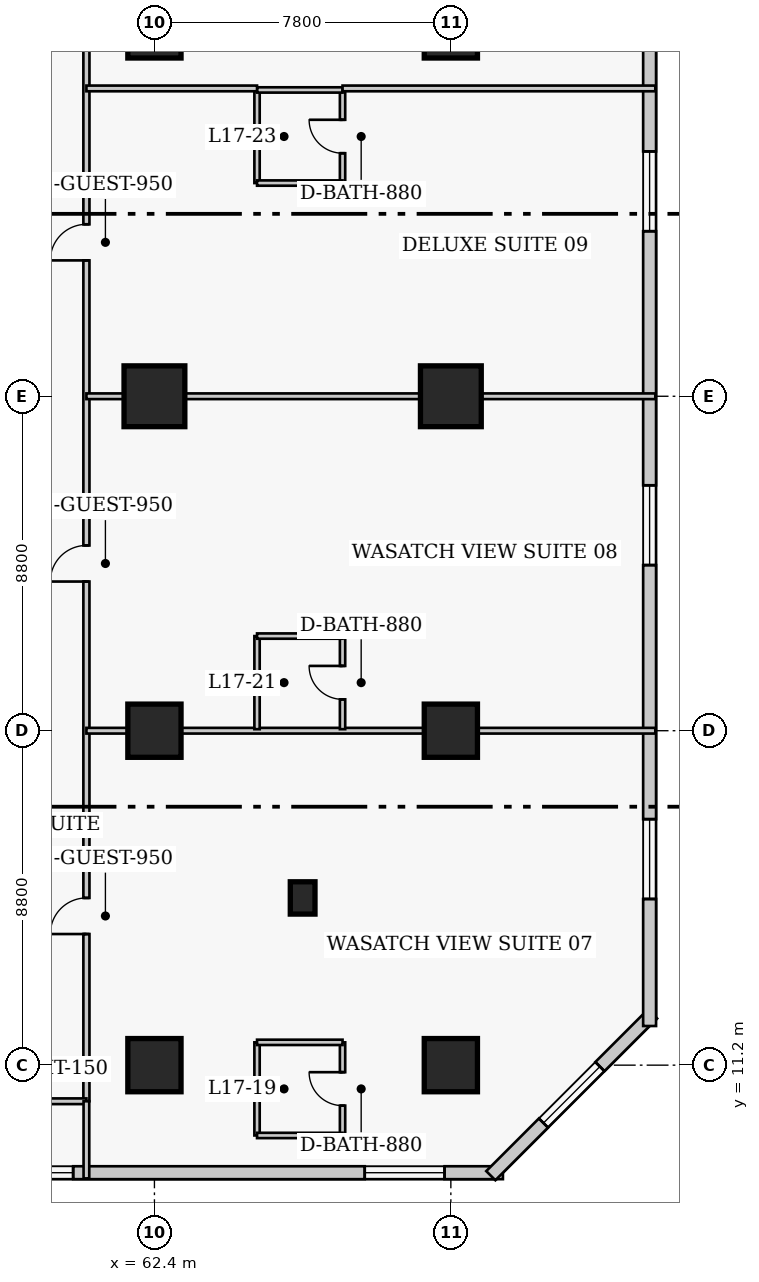
"""IFC4 building model, lengths in metres.
Left out: names, types, materials, properties, quantities, classifications, styles, units other than length and angle.
Written with IfcOpenShell. Run it as: python <this file> out.ifc"""

import sys

from ifc_helpers import new_model, si_unit, direction, frame, frame_2d, origin, origin_2d, place, context, subcontext, project, spatial, rectangle, extrude, element, fill, save


model = new_model("IFC4")
c1 = context("Model", 3, precision=1e-05, world=origin(), true_north=direction((0.0, 1.0)))
c2 = subcontext(c1, "Body", "Model", "MODEL_VIEW")
j1 = project(units=[si_unit("LENGTHUNIT", "METRE"), si_unit("PLANEANGLEUNIT", "RADIAN")], contexts=[c1])
p1 = place(None, origin())
s1 = spatial("IfcSite", under=j1, at=p1, CompositionType="ELEMENT")
p2 = place(p1, origin())
s2 = spatial("IfcBuilding", under=s1, at=p2, CompositionType="ELEMENT")
p3 = place(p2, frame((0.0, 0.0, 71.6)))
s3 = spatial("IfcBuildingStorey", under=s2, at=p3, CompositionType="ELEMENT", Elevation=71.6)
for number, where, z_axis, x_axis in (
    (1, (62.4, 11.2, 0.0), (0.0, 0.0, 1.0), (1.0, 0.0, 0.0)),
    (2, (62.4, 20.0, 0.0), (0.0, 0.0, 1.0), (1.0, 0.0, 0.0)),
):
    element("IfcColumn", number, at=place(p3, frame(where, z_axis=z_axis, x_axis=x_axis)), inside=s3, PredefinedType="COLUMN", context=c2, shape_type="SweptSolid", body=[
        extrude(rectangle(XDim=1.4, YDim=1.4, at=origin_2d()), origin(), (0.0, 0.0, 1.0), 3.8),
    ])
p4 = place(p3, frame((62.4, 28.8, 0.0), z_axis=(0.0, 0.0, 1.0), x_axis=(1.0, 0.0, 0.0)))
e3 = element("IfcColumn", 3, at=p4, inside=s3, PredefinedType="COLUMN", context=c2, shape_type="SweptSolid", body=[
    extrude(rectangle(XDim=1.6, YDim=1.6, at=origin_2d()), origin(), (0.0, 0.0, 1.0), 3.8),
])
for number, where, z_axis, x_axis in (
    (4, (62.4, 38.4, 0.0), (0.0, 0.0, 1.0), (1.0, 0.0, 0.0)),
    (5, (70.2, 11.2, 0.0), (0.0, 0.0, 1.0), (1.0, 0.0, 0.0)),
    (6, (70.2, 20.0, 0.0), (0.0, 0.0, 1.0), (1.0, 0.0, 0.0)),
):
    element("IfcColumn", number, at=place(p3, frame(where, z_axis=z_axis, x_axis=x_axis)), inside=s3, PredefinedType="COLUMN", context=c2, shape_type="SweptSolid", body=[
        extrude(rectangle(XDim=1.4, YDim=1.4, at=origin_2d()), origin(), (0.0, 0.0, 1.0), 3.8),
    ])
p5 = place(p3, frame((70.2, 28.8, 0.0), z_axis=(0.0, 0.0, 1.0), x_axis=(1.0, 0.0, 0.0)))
e7 = element("IfcColumn", 7, at=p5, inside=s3, PredefinedType="COLUMN", context=c2, shape_type="SweptSolid", body=[
    extrude(rectangle(XDim=1.6, YDim=1.6, at=origin_2d()), origin(), (0.0, 0.0, 1.0), 3.8),
])
p6 = place(p3, frame((70.2, 38.4, 0.0), z_axis=(0.0, 0.0, 1.0), x_axis=(1.0, 0.0, 0.0)))
e8 = element("IfcColumn", 8, at=p6, inside=s3, PredefinedType="COLUMN", context=c2, shape_type="SweptSolid", body=[
    extrude(rectangle(XDim=1.4, YDim=1.4, at=origin_2d()), origin(), (0.0, 0.0, 1.0), 3.8),
])
p7 = place(p3, frame((66.3, 15.6, 0.0), z_axis=(0.0, 0.0, 1.0), x_axis=(1.0, 0.0, 0.0)))
e9 = element("IfcColumn", 9, at=p7, inside=s3, PredefinedType="PILASTER", context=c2, shape_type="SweptSolid", body=[
    extrude(rectangle(XDim=0.65, YDim=0.85, at=origin_2d()), origin(), (0.0, 0.0, 1.0), 3.8),
])
p8 = place(p3, frame((41.68, 8.37, 0.0), z_axis=(0.0, 0.0, 1.0), x_axis=(1.0, 0.0, 0.0)))
e10 = element("IfcWall", 10, at=p8, inside=s3, PredefinedType="SOLIDWALL", context=c2, shape_type="SweptSolid", body=[
    extrude(rectangle(XDim=29.89, YDim=0.34, at=frame_2d((14.945, 0.0))), origin(), (0.0, 0.0, 1.0), 3.42),
])
p9 = place(p8, frame((16.481, 0.0, 0.85)))
e11 = element("IfcOpeningElement", 11, at=p9, cuts=e10, PredefinedType="OPENING", context=c2, shape_type="SweptSolid", body=[
    extrude(rectangle(XDim=2.1, YDim=1.85, at=frame_2d((1.05, 0.925))), frame((0.0, 0.18, 0.0), z_axis=(0.0, -1.0, 0.0), x_axis=(1.0, 0.0, 0.0)), (0.0, 0.0, 1.0), 0.36),
])
p10 = place(p8, frame((26.254, 0.0, 0.85)))
e12 = element("IfcOpeningElement", 12, at=p10, cuts=e10, PredefinedType="OPENING", context=c2, shape_type="SweptSolid", body=[
    extrude(rectangle(XDim=2.1, YDim=1.85, at=frame_2d((1.05, 0.925))), frame((0.0, 0.18, 0.0), z_axis=(0.0, -1.0, 0.0), x_axis=(1.0, 0.0, 0.0)), (0.0, 0.0, 1.0), 0.36),
])
p11 = place(p8, frame((6.225, 0.0, 0.85)))
e13 = element("IfcOpeningElement", 13, at=p11, cuts=e10, PredefinedType="OPENING", context=c2, shape_type="SweptSolid", body=[
    extrude(rectangle(XDim=1.3, YDim=1.7, at=frame_2d((0.65, 0.85))), frame((0.0, 0.18, 0.0), z_axis=(0.0, -1.0, 0.0), x_axis=(1.0, 0.0, 0.0)), (0.0, 0.0, 1.0), 0.36),
])
p12 = place(p8, frame((13.93, 0.0, 0.85)))
e14 = element("IfcOpeningElement", 14, at=p12, cuts=e10, PredefinedType="OPENING", context=c2, shape_type="SweptSolid", body=[
    extrude(rectangle(XDim=1.3, YDim=1.7, at=frame_2d((0.65, 0.85))), frame((0.0, 0.18, 0.0), z_axis=(0.0, -1.0, 0.0), x_axis=(1.0, 0.0, 0.0)), (0.0, 0.0, 1.0), 0.36),
])
p13 = place(p3, frame((71.251, 8.292, 0.0), z_axis=(0.0, 0.0, 1.0), x_axis=(0.707106781187, 0.707106781187, 0.0)))
e15 = element("IfcWall", 15, at=p13, inside=s3, PredefinedType="SOLIDWALL", context=c2, shape_type="SweptSolid", body=[
    extrude(rectangle(XDim=6.02, YDim=0.34, at=frame_2d((3.01, 0.0))), origin(), (0.0, 0.0, 1.0), 3.42),
])
p14 = place(p13, frame((1.96, 0.0, 0.85)))
e16 = element("IfcOpeningElement", 16, at=p14, cuts=e15, PredefinedType="OPENING", context=c2, shape_type="SweptSolid", body=[
    extrude(rectangle(XDim=2.1, YDim=1.85, at=frame_2d((1.05, 0.925))), frame((0.0, 0.18, 0.0), z_axis=(0.0, -1.0, 0.0), x_axis=(1.0, 0.0, 0.0)), (0.0, 0.0, 1.0), 0.36),
])
p15 = place(p3, frame((75.43, 12.23, 0.0), z_axis=(0.0, 0.0, 1.0), x_axis=(0.0, 1.0, 0.0)))
e17 = element("IfcWall", 17, at=p15, inside=s3, PredefinedType="SOLIDWALL", context=c2, shape_type="SweptSolid", body=[
    extrude(rectangle(XDim=35.14, YDim=0.34, at=frame_2d((17.57, 0.0))), origin(), (0.0, 0.0, 1.0), 3.42),
])
p16 = place(p15, frame((3.343, 0.0, 0.85)))
e18 = element("IfcOpeningElement", 18, at=p16, cuts=e17, PredefinedType="OPENING", context=c2, shape_type="SweptSolid", body=[
    extrude(rectangle(XDim=2.1, YDim=1.85, at=frame_2d((1.05, 0.925))), frame((0.0, 0.18, 0.0), z_axis=(0.0, -1.0, 0.0), x_axis=(1.0, 0.0, 0.0)), (0.0, 0.0, 1.0), 0.36),
])
p17 = place(p15, frame((12.127, 0.0, 0.85)))
e19 = element("IfcOpeningElement", 19, at=p17, cuts=e17, PredefinedType="OPENING", context=c2, shape_type="SweptSolid", body=[
    extrude(rectangle(XDim=2.1, YDim=1.85, at=frame_2d((1.05, 0.925))), frame((0.0, 0.18, 0.0), z_axis=(0.0, -1.0, 0.0), x_axis=(1.0, 0.0, 0.0)), (0.0, 0.0, 1.0), 0.36),
])
p18 = place(p15, frame((20.913, 0.0, 0.85)))
e20 = element("IfcOpeningElement", 20, at=p18, cuts=e17, PredefinedType="OPENING", context=c2, shape_type="SweptSolid", body=[
    extrude(rectangle(XDim=2.1, YDim=1.85, at=frame_2d((1.05, 0.925))), frame((0.0, 0.18, 0.0), z_axis=(0.0, -1.0, 0.0), x_axis=(1.0, 0.0, 0.0)), (0.0, 0.0, 1.0), 0.36),
])
p19 = place(p15, frame((29.698, 0.0, 0.85)))
e21 = element("IfcOpeningElement", 21, at=p19, cuts=e17, PredefinedType="OPENING", context=c2, shape_type="SweptSolid", body=[
    extrude(rectangle(XDim=2.1, YDim=1.85, at=frame_2d((1.05, 0.925))), frame((0.0, 0.18, 0.0), z_axis=(0.0, -1.0, 0.0), x_axis=(1.0, 0.0, 0.0)), (0.0, 0.0, 1.0), 0.36),
])
p20 = place(p3, frame((60.61, 10.25, 0.0), z_axis=(0.0, 0.0, 1.0), x_axis=(0.0, 1.0, 0.0)))
e22 = element("IfcWall", 22, at=p20, inside=s3, PredefinedType="PARTITIONING", context=c2, shape_type="SweptSolid", body=[
    extrude(rectangle(XDim=30.4, YDim=0.16, at=frame_2d((15.2, 0.0))), origin(), (0.0, 0.0, 1.0), 3.42),
])
p21 = place(p20, frame((4.4, 0.0, 0.0)))
e23 = element("IfcOpeningElement", 23, at=p21, cuts=e22, PredefinedType="OPENING", context=c2, shape_type="SweptSolid", body=[
    extrude(rectangle(XDim=0.95, YDim=2.1, at=frame_2d((0.475, 1.05))), frame((0.0, 0.09, 0.0), z_axis=(0.0, -1.0, 0.0), x_axis=(1.0, 0.0, 0.0)), (0.0, 0.0, 1.0), 0.18),
])
p22 = place(p20, frame((13.675, 0.0, 0.0)))
e24 = element("IfcOpeningElement", 24, at=p22, cuts=e22, PredefinedType="OPENING", context=c2, shape_type="SweptSolid", body=[
    extrude(rectangle(XDim=0.95, YDim=2.1, at=frame_2d((0.475, 1.05))), frame((0.0, 0.09, 0.0), z_axis=(0.0, -1.0, 0.0), x_axis=(1.0, 0.0, 0.0)), (0.0, 0.0, 1.0), 0.18),
])
p23 = place(p20, frame((22.125, 0.0, 0.0)))
e25 = element("IfcOpeningElement", 25, at=p23, cuts=e22, PredefinedType="OPENING", context=c2, shape_type="SweptSolid", body=[
    extrude(rectangle(XDim=0.95, YDim=2.1, at=frame_2d((0.475, 1.05))), frame((0.0, 0.09, 0.0), z_axis=(0.0, -1.0, 0.0), x_axis=(1.0, 0.0, 0.0)), (0.0, 0.0, 1.0), 0.18),
])
p24 = place(p20, frame((28.96, 0.0, 0.0)))
e26 = element("IfcOpeningElement", 26, at=p24, cuts=e22, PredefinedType="OPENING", context=c2, shape_type="SweptSolid", body=[
    extrude(rectangle(XDim=1.0, YDim=2.15, at=frame_2d((0.5, 1.075))), frame((0.0, 0.09, 0.0), z_axis=(0.0, -1.0, 0.0), x_axis=(1.0, 0.0, 0.0)), (0.0, 0.0, 1.0), 0.18),
])
p25 = place(p3, frame((58.39, 10.25, 0.0), z_axis=(0.0, 0.0, 1.0), x_axis=(1.0, 0.0, 0.0)))
e27 = element("IfcWall", 27, at=p25, inside=s3, PredefinedType="PARTITIONING", context=c2, shape_type="SweptSolid", body=[
    extrude(rectangle(XDim=2.22, YDim=0.15, at=frame_2d((1.11, 0.0))), origin(), (0.0, 0.0, 1.0), 3.42),
])
p26 = place(p3, frame((60.61, 8.22, 0.0), z_axis=(0.0, 0.0, 1.0), x_axis=(0.0, 1.0, 0.0)))
e28 = element("IfcWall", 28, at=p26, inside=s3, PredefinedType="PARTITIONING", context=c2, shape_type="SweptSolid", body=[
    extrude(rectangle(XDim=2.03, YDim=0.15, at=frame_2d((1.015, 0.0))), origin(), (0.0, 0.0, 1.0), 3.42),
])
p27 = place(p3, frame((65.1, 9.35, 0.0), z_axis=(0.0, 0.0, 1.0), x_axis=(0.0, 1.0, 0.0)))
e29 = element("IfcWall", 29, at=p27, inside=s3, PredefinedType="PLUMBINGWALL", context=c2, shape_type="SweptSolid", body=[
    extrude(rectangle(XDim=2.45, YDim=0.14, at=frame_2d((1.225, 0.0))), origin(), (0.0, 0.0, 1.0), 3.42),
])
p28 = place(p3, frame((67.35, 9.35, 0.0), z_axis=(0.0, 0.0, 1.0), x_axis=(0.0, 1.0, 0.0)))
e30 = element("IfcWall", 30, at=p28, inside=s3, PredefinedType="PLUMBINGWALL", context=c2, shape_type="SweptSolid", body=[
    extrude(rectangle(XDim=2.45, YDim=0.14, at=frame_2d((1.225, 0.0))), origin(), (0.0, 0.0, 1.0), 3.42),
])
p29 = place(p28, frame((0.785, 0.0, 0.0)))
e31 = element("IfcOpeningElement", 31, at=p29, cuts=e30, PredefinedType="OPENING", context=c2, shape_type="SweptSolid", body=[
    extrude(rectangle(XDim=0.88, YDim=2.05, at=frame_2d((0.44, 1.025))), frame((0.0, 0.08, 0.0), z_axis=(0.0, -1.0, 0.0), x_axis=(1.0, 0.0, 0.0)), (0.0, 0.0, 1.0), 0.16),
])
for number, where, z_axis, x_axis in (
    (32, (65.1, 9.35, 0.0), (0.0, 0.0, 1.0), (1.0, 0.0, 0.0)),
    (33, (65.1, 11.8, 0.0), (0.0, 0.0, 1.0), (1.0, 0.0, 0.0)),
):
    element("IfcWall", number, at=place(p3, frame(where, z_axis=z_axis, x_axis=x_axis)), inside=s3, PredefinedType="PLUMBINGWALL", context=c2, shape_type="SweptSolid", body=[
        extrude(rectangle(XDim=2.25, YDim=0.14, at=frame_2d((1.125, 0.0))), origin(), (0.0, 0.0, 1.0), 3.42),
    ])
p30 = place(p3, frame((60.61, 20.0, 0.0), z_axis=(0.0, 0.0, 1.0), x_axis=(1.0, 0.0, 0.0)))
e34 = element("IfcWall", 34, at=p30, inside=s3, PredefinedType="PARTITIONING", context=c2, shape_type="SweptSolid", body=[
    extrude(rectangle(XDim=14.97, YDim=0.15, at=frame_2d((7.485, 0.0))), origin(), (0.0, 0.0, 1.0), 2.473),
])
p31 = place(p3, frame((65.1, 20.04, 0.0), z_axis=(0.0, 0.0, 1.0), x_axis=(0.0, 1.0, 0.0)))
e35 = element("IfcWall", 35, at=p31, inside=s3, PredefinedType="PLUMBINGWALL", context=c2, shape_type="SweptSolid", body=[
    extrude(rectangle(XDim=2.45, YDim=0.14, at=frame_2d((1.225, 0.0))), origin(), (0.0, 0.0, 1.0), 3.42),
])
p32 = place(p3, frame((67.35, 20.04, 0.0), z_axis=(0.0, 0.0, 1.0), x_axis=(0.0, 1.0, 0.0)))
e36 = element("IfcWall", 36, at=p32, inside=s3, PredefinedType="PLUMBINGWALL", context=c2, shape_type="SweptSolid", body=[
    extrude(rectangle(XDim=2.45, YDim=0.14, at=frame_2d((1.225, 0.0))), origin(), (0.0, 0.0, 1.0), 3.42),
])
p33 = place(p32, frame((0.785, 0.0, 0.0)))
e37 = element("IfcOpeningElement", 37, at=p33, cuts=e36, PredefinedType="OPENING", context=c2, shape_type="SweptSolid", body=[
    extrude(rectangle(XDim=0.88, YDim=2.05, at=frame_2d((0.44, 1.025))), frame((0.0, 0.08, 0.0), z_axis=(0.0, -1.0, 0.0), x_axis=(1.0, 0.0, 0.0)), (0.0, 0.0, 1.0), 0.16),
])
p34 = place(p3, frame((65.1, 22.49, 0.0), z_axis=(0.0, 0.0, 1.0), x_axis=(1.0, 0.0, 0.0)))
e38 = element("IfcWall", 38, at=p34, inside=s3, PredefinedType="PLUMBINGWALL", context=c2, shape_type="SweptSolid", body=[
    extrude(rectangle(XDim=2.25, YDim=0.14, at=frame_2d((1.125, 0.0))), origin(), (0.0, 0.0, 1.0), 3.42),
])
p35 = place(p3, frame((60.61, 28.8, 0.0), z_axis=(0.0, 0.0, 1.0), x_axis=(1.0, 0.0, 0.0)))
e39 = element("IfcWall", 39, at=p35, inside=s3, PredefinedType="PARTITIONING", context=c2, shape_type="SweptSolid", body=[
    extrude(rectangle(XDim=14.97, YDim=0.15, at=frame_2d((7.485, 0.0))), origin(), (0.0, 0.0, 1.0), 2.473),
])
p36 = place(p3, frame((65.1, 34.41, 0.0), z_axis=(0.0, 0.0, 1.0), x_axis=(0.0, 1.0, 0.0)))
e40 = element("IfcWall", 40, at=p36, inside=s3, PredefinedType="PLUMBINGWALL", context=c2, shape_type="SweptSolid", body=[
    extrude(rectangle(XDim=2.45, YDim=0.14, at=frame_2d((1.225, 0.0))), origin(), (0.0, 0.0, 1.0), 3.42),
])
p37 = place(p3, frame((67.35, 34.41, 0.0), z_axis=(0.0, 0.0, 1.0), x_axis=(0.0, 1.0, 0.0)))
e41 = element("IfcWall", 41, at=p37, inside=s3, PredefinedType="PLUMBINGWALL", context=c2, shape_type="SweptSolid", body=[
    extrude(rectangle(XDim=2.45, YDim=0.14, at=frame_2d((1.225, 0.0))), origin(), (0.0, 0.0, 1.0), 3.42),
])
p38 = place(p37, frame((0.785, 0.0, 0.0)))
e42 = element("IfcOpeningElement", 42, at=p38, cuts=e41, PredefinedType="OPENING", context=c2, shape_type="SweptSolid", body=[
    extrude(rectangle(XDim=0.88, YDim=2.05, at=frame_2d((0.44, 1.025))), frame((0.0, 0.08, 0.0), z_axis=(0.0, -1.0, 0.0), x_axis=(1.0, 0.0, 0.0)), (0.0, 0.0, 1.0), 0.16),
])
for number, where, z_axis, x_axis in (
    (43, (65.1, 34.41, 0.0), (0.0, 0.0, 1.0), (1.0, 0.0, 0.0)),
    (44, (65.1, 36.86, 0.0), (0.0, 0.0, 1.0), (1.0, 0.0, 0.0)),
):
    element("IfcWall", number, at=place(p3, frame(where, z_axis=z_axis, x_axis=x_axis)), inside=s3, PredefinedType="PLUMBINGWALL", context=c2, shape_type="SweptSolid", body=[
        extrude(rectangle(XDim=2.25, YDim=0.14, at=frame_2d((1.125, 0.0))), origin(), (0.0, 0.0, 1.0), 3.42),
    ])
p39 = place(p3, frame((60.61, 36.9, 0.0), z_axis=(0.0, 0.0, 1.0), x_axis=(1.0, 0.0, 0.0)))
e45 = element("IfcWall", 45, at=p39, inside=s3, PredefinedType="PARTITIONING", context=c2, shape_type="SweptSolid", body=[
    extrude(rectangle(XDim=4.49, YDim=0.15, at=frame_2d((2.245, 0.0))), origin(), (0.0, 0.0, 1.0), 3.42),
])
p40 = place(p3, frame((67.35, 36.9, 0.0), z_axis=(0.0, 0.0, 1.0), x_axis=(1.0, 0.0, 0.0)))
e46 = element("IfcWall", 46, at=p40, inside=s3, PredefinedType="PARTITIONING", context=c2, shape_type="SweptSolid", body=[
    extrude(rectangle(XDim=8.23, YDim=0.15, at=frame_2d((4.115, 0.0))), origin(), (0.0, 0.0, 1.0), 3.42),
])
p41 = place(p9, origin())
e47 = element("IfcWindow", 47, at=p41, inside=s3, PartitioningType="SINGLE_PANEL", PredefinedType="WINDOW", context=c2, shape_type="SweptSolid", body=[
    extrude(rectangle(XDim=2.1, YDim=1.85, at=frame_2d((1.05, 0.925))), frame((0.0, 0.03, 0.0), z_axis=(0.0, -1.0, 0.0), x_axis=(1.0, 0.0, 0.0)), (0.0, 0.0, 1.0), 0.06),
])
fill(e11, e47)
p42 = place(p10, origin())
e48 = element("IfcWindow", 48, at=p42, inside=s3, PartitioningType="SINGLE_PANEL", PredefinedType="WINDOW", context=c2, shape_type="SweptSolid", body=[
    extrude(rectangle(XDim=2.1, YDim=1.85, at=frame_2d((1.05, 0.925))), frame((0.0, 0.03, 0.0), z_axis=(0.0, -1.0, 0.0), x_axis=(1.0, 0.0, 0.0)), (0.0, 0.0, 1.0), 0.06),
])
fill(e12, e48)
p43 = place(p14, origin())
e49 = element("IfcWindow", 49, at=p43, inside=s3, PartitioningType="SINGLE_PANEL", PredefinedType="WINDOW", context=c2, shape_type="SweptSolid", body=[
    extrude(rectangle(XDim=2.1, YDim=1.85, at=frame_2d((1.05, 0.925))), frame((0.0, 0.03, 0.0), z_axis=(0.0, -1.0, 0.0), x_axis=(1.0, 0.0, 0.0)), (0.0, 0.0, 1.0), 0.06),
])
fill(e16, e49)
p44 = place(p16, origin())
e50 = element("IfcWindow", 50, at=p44, inside=s3, PartitioningType="SINGLE_PANEL", PredefinedType="WINDOW", context=c2, shape_type="SweptSolid", body=[
    extrude(rectangle(XDim=2.1, YDim=1.85, at=frame_2d((1.05, 0.925))), frame((0.0, 0.03, 0.0), z_axis=(0.0, -1.0, 0.0), x_axis=(1.0, 0.0, 0.0)), (0.0, 0.0, 1.0), 0.06),
])
fill(e18, e50)
p45 = place(p17, origin())
e51 = element("IfcWindow", 51, at=p45, inside=s3, PartitioningType="SINGLE_PANEL", PredefinedType="WINDOW", context=c2, shape_type="SweptSolid", body=[
    extrude(rectangle(XDim=2.1, YDim=1.85, at=frame_2d((1.05, 0.925))), frame((0.0, 0.03, 0.0), z_axis=(0.0, -1.0, 0.0), x_axis=(1.0, 0.0, 0.0)), (0.0, 0.0, 1.0), 0.06),
])
fill(e19, e51)
p46 = place(p18, origin())
e52 = element("IfcWindow", 52, at=p46, inside=s3, PartitioningType="SINGLE_PANEL", PredefinedType="WINDOW", context=c2, shape_type="SweptSolid", body=[
    extrude(rectangle(XDim=2.1, YDim=1.85, at=frame_2d((1.05, 0.925))), frame((0.0, 0.03, 0.0), z_axis=(0.0, -1.0, 0.0), x_axis=(1.0, 0.0, 0.0)), (0.0, 0.0, 1.0), 0.06),
])
fill(e20, e52)
p47 = place(p29, origin())
e53 = element("IfcDoor", 53, at=p47, inside=s3, OperationType="SINGLE_SWING_RIGHT", PredefinedType="DOOR", context=c2, shape_type="SweptSolid", body=[
    extrude(rectangle(XDim=0.88, YDim=2.05, at=frame_2d((0.44, 1.025))), frame((0.0, 0.025, 0.0), z_axis=(0.0, -1.0, 0.0), x_axis=(1.0, 0.0, 0.0)), (0.0, 0.0, 1.0), 0.05),
])
fill(e31, e53)
p48 = place(p21, origin())
e54 = element("IfcDoor", 54, at=p48, inside=s3, OperationType="SINGLE_SWING_LEFT", PredefinedType="DOOR", context=c2, shape_type="SweptSolid", body=[
    extrude(rectangle(XDim=0.95, YDim=2.1, at=frame_2d((0.475, 1.05))), frame((0.0, 0.025, 0.0), z_axis=(0.0, -1.0, 0.0), x_axis=(1.0, 0.0, 0.0)), (0.0, 0.0, 1.0), 0.05),
])
fill(e23, e54)
p49 = place(p33, origin())
e55 = element("IfcDoor", 55, at=p49, inside=s3, OperationType="SINGLE_SWING_RIGHT", PredefinedType="DOOR", context=c2, shape_type="SweptSolid", body=[
    extrude(rectangle(XDim=0.88, YDim=2.05, at=frame_2d((0.44, 1.025))), frame((0.0, 0.025, 0.0), z_axis=(0.0, -1.0, 0.0), x_axis=(1.0, 0.0, 0.0)), (0.0, 0.0, 1.0), 0.05),
])
fill(e37, e55)
p50 = place(p22, origin())
e56 = element("IfcDoor", 56, at=p50, inside=s3, OperationType="SINGLE_SWING_LEFT", PredefinedType="DOOR", context=c2, shape_type="SweptSolid", body=[
    extrude(rectangle(XDim=0.95, YDim=2.1, at=frame_2d((0.475, 1.05))), frame((0.0, 0.025, 0.0), z_axis=(0.0, -1.0, 0.0), x_axis=(1.0, 0.0, 0.0)), (0.0, 0.0, 1.0), 0.05),
])
fill(e24, e56)
p51 = place(p38, origin())
e57 = element("IfcDoor", 57, at=p51, inside=s3, OperationType="SINGLE_SWING_RIGHT", PredefinedType="DOOR", context=c2, shape_type="SweptSolid", body=[
    extrude(rectangle(XDim=0.88, YDim=2.05, at=frame_2d((0.44, 1.025))), frame((0.0, 0.025, 0.0), z_axis=(0.0, -1.0, 0.0), x_axis=(1.0, 0.0, 0.0)), (0.0, 0.0, 1.0), 0.05),
])
fill(e42, e57)
p52 = place(p23, origin())
e58 = element("IfcDoor", 58, at=p52, inside=s3, OperationType="SINGLE_SWING_LEFT", PredefinedType="DOOR", context=c2, shape_type="SweptSolid", body=[
    extrude(rectangle(XDim=0.95, YDim=2.1, at=frame_2d((0.475, 1.05))), frame((0.0, 0.025, 0.0), z_axis=(0.0, -1.0, 0.0), x_axis=(1.0, 0.0, 0.0)), (0.0, 0.0, 1.0), 0.05),
])
fill(e25, e58)
save(model, sys.argv[1])
